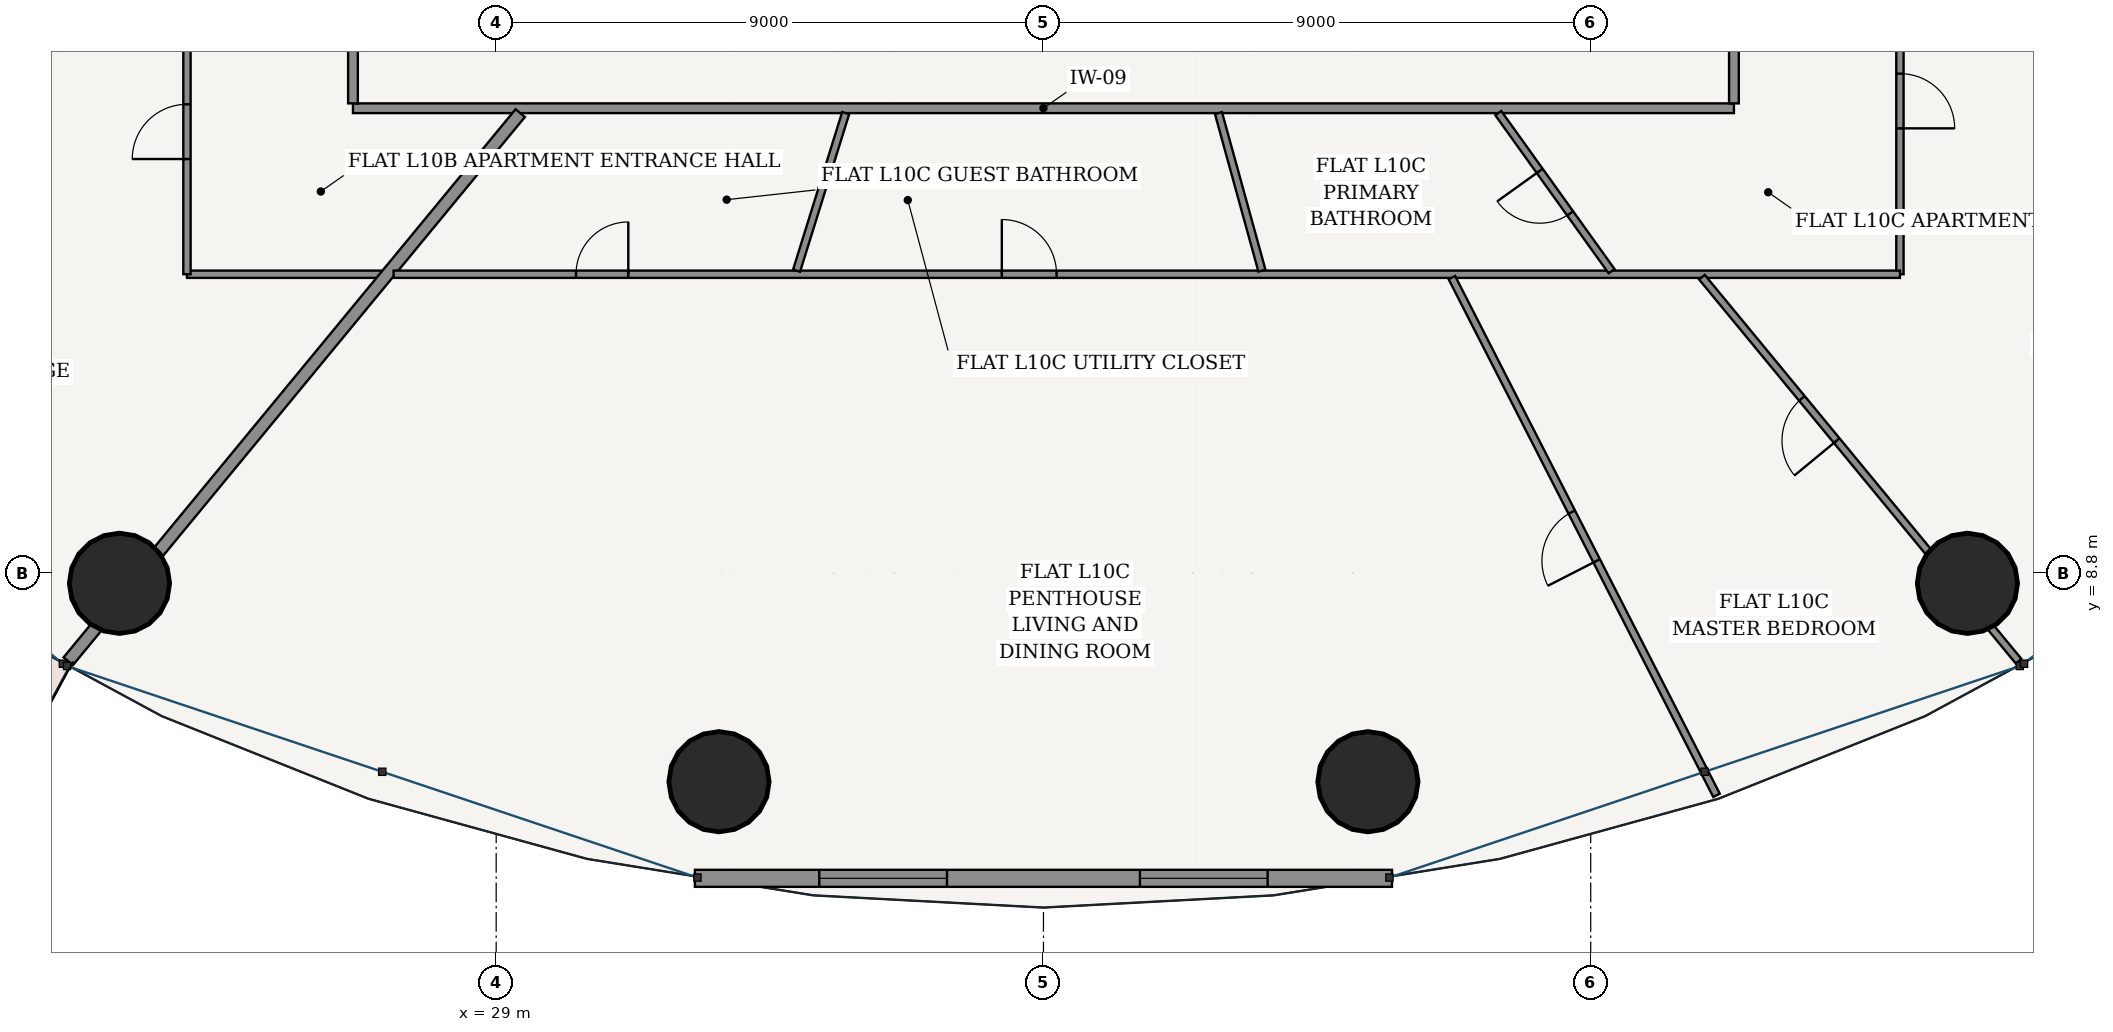
"""IFC4 building model, lengths in metres.
Left out: names, types, materials, properties, quantities, classifications, styles, units other than length and angle.
Written with IfcOpenShell. Run it as: python <this file> out.ifc"""

import sys

from ifc_helpers import new_model, si_unit, direction, frame, frame_2d, origin, origin_2d, place, context, subcontext, project, spatial, rectangle, hollow_circle, extrude, source, transform, mapped, element, fill, save


model = new_model("IFC4")
c1 = context("Model", 3, precision=1e-05, world=origin(), true_north=direction((-0.2419218956, 0.970295726276)))
c2 = subcontext(c1, "Body", "Model", "MODEL_VIEW")
j1 = project(units=[si_unit("LENGTHUNIT", "METRE"), si_unit("PLANEANGLEUNIT", "RADIAN")], contexts=[c1])
p1 = place(None, origin())
s1 = spatial("IfcSite", under=j1, at=p1, CompositionType="ELEMENT")
p2 = place(p1, origin())
s2 = spatial("IfcBuilding", under=s1, at=p2, CompositionType="ELEMENT")
p3 = place(p2, frame((0.0, 0.0, 42.0)))
s3 = spatial("IfcBuildingStorey", under=s2, at=p3, CompositionType="ELEMENT", Elevation=42.0)
for number, where, z_axis, x_axis in (
    (1, (22.805, 8.632, 0.0), (0.0, 0.0, 1.0), (1.0, 0.0, 0.0)),
    (2, (32.664, 5.37, 0.0), (0.0, 0.0, 1.0), (1.0, 0.0, 0.0)),
    (3, (43.336, 5.37, 0.0), (0.0, 0.0, 1.0), (1.0, 0.0, 0.0)),
    (4, (53.195, 8.632, 0.0), (0.0, 0.0, 1.0), (1.0, 0.0, 0.0)),
):
    element("IfcColumn", number, at=place(p3, frame(where, z_axis=z_axis, x_axis=x_axis)), inside=s3, PredefinedType="COLUMN", context=c2, shape_type="SweptSolid", body=[
        extrude(hollow_circle(Radius=0.825, WallThickness=0.05, at=origin_2d()), origin(), (0.0, 0.0, 1.0), 3.6),
    ])
p4 = place(p3, frame((32.268, 3.781, 0.0), z_axis=(0.0, 0.0, 1.0), x_axis=(1.0, 0.0, 0.0)))
e5 = element("IfcWall", 5, at=p4, inside=s3, PredefinedType="SOLIDWALL", context=c2, shape_type="SweptSolid", body=[
    extrude(rectangle(XDim=11.463, YDim=0.28, at=frame_2d((5.732, 0.0))), origin(), (0.0, 0.0, 1.0), 3.32),
])
p5 = place(p4, frame((2.045, 0.0, 0.85)))
e6 = element("IfcOpeningElement", 6, at=p5, cuts=e5, PredefinedType="OPENING", context=c2, shape_type="SweptSolid", body=[
    extrude(rectangle(XDim=2.1, YDim=1.95, at=frame_2d((1.05, 0.975))), frame((0.0, 0.15, 0.0), z_axis=(0.0, -1.0, 0.0), x_axis=(1.0, 0.0, 0.0)), (0.0, 0.0, 1.0), 0.3),
])
p6 = place(p4, frame((7.318, 0.0, 0.85)))
e7 = element("IfcOpeningElement", 7, at=p6, cuts=e5, PredefinedType="OPENING", context=c2, shape_type="SweptSolid", body=[
    extrude(rectangle(XDim=2.1, YDim=1.95, at=frame_2d((1.05, 0.975))), frame((0.0, 0.15, 0.0), z_axis=(0.0, -1.0, 0.0), x_axis=(1.0, 0.0, 0.0)), (0.0, 0.0, 1.0), 0.3),
])
p7 = place(p3, frame((26.645, 16.445, 0.0), z_axis=(0.0, 0.0, 1.0), x_axis=(1.0, 0.0, 0.0)))
e8 = element("IfcWall", 8, at=p7, inside=s3, PredefinedType="PARTITIONING", context=c2, shape_type="SweptSolid", body=[
    extrude(rectangle(XDim=22.71, YDim=0.16, at=frame_2d((11.355, 0.0))), origin(), (0.0, 0.0, 1.0), 2.688),
])
p8 = place(p3, frame((26.645, 16.525, 0.0), z_axis=(0.0, 0.0, 1.0), x_axis=(0.0, 1.0, 0.0)))
e9 = element("IfcWall", 9, at=p8, inside=s3, PredefinedType="PARTITIONING", context=c2, shape_type="SweptSolid", body=[
    extrude(rectangle(XDim=20.55, YDim=0.16, at=frame_2d((10.275, 0.0))), origin(), (0.0, 0.0, 1.0), 2.688),
])
p9 = place(p8, frame((1.226, 0.0, 0.0)))
e10 = element("IfcOpeningElement", 10, at=p9, cuts=e9, PredefinedType="OPENING", context=c2, shape_type="SweptSolid", body=[
    extrude(rectangle(XDim=0.98, YDim=2.2, at=frame_2d((0.49, 1.1))), frame((0.0, 0.09, 0.0), z_axis=(0.0, -1.0, 0.0), x_axis=(1.0, 0.0, 0.0)), (0.0, 0.0, 1.0), 0.18),
])
p10 = place(p3, frame((49.355, 16.525, 0.0), z_axis=(0.0, 0.0, 1.0), x_axis=(0.0, 1.0, 0.0)))
e11 = element("IfcWall", 11, at=p10, inside=s3, PredefinedType="PARTITIONING", context=c2, shape_type="SweptSolid", body=[
    extrude(rectangle(XDim=20.55, YDim=0.16, at=frame_2d((10.275, 0.0))), origin(), (0.0, 0.0, 1.0), 2.688),
])
p11 = place(p10, frame((17.207, 0.0, 0.0)))
e12 = element("IfcOpeningElement", 12, at=p11, cuts=e11, PredefinedType="OPENING", context=c2, shape_type="SweptSolid", body=[
    extrude(rectangle(XDim=0.98, YDim=2.2, at=frame_2d((0.49, 1.1))), frame((0.0, 0.09, 0.0), z_axis=(0.0, -1.0, 0.0), x_axis=(1.0, 0.0, 0.0)), (0.0, 0.0, 1.0), 0.18),
])
p12 = place(p10, frame((1.892, 0.0, 0.0)))
e13 = element("IfcOpeningElement", 13, at=p12, cuts=e11, PredefinedType="OPENING", context=c2, shape_type="SweptSolid", body=[
    extrude(rectangle(XDim=0.98, YDim=2.2, at=frame_2d((0.49, 1.1))), frame((0.0, 0.09, 0.0), z_axis=(0.0, -1.0, 0.0), x_axis=(1.0, 0.0, 0.0)), (0.0, 0.0, 1.0), 0.18),
])
p13 = place(p3, frame((27.109, 13.715, 0.0), z_axis=(0.0, 0.0, 1.0), x_axis=(-1.0, 0.0, 0.0)))
e14 = element("IfcWall", 14, at=p13, inside=s3, PredefinedType="PARTITIONING", context=c2, shape_type="SweptSolid", body=[
    extrude(rectangle(XDim=3.194, YDim=0.12, at=frame_2d((1.597, 0.0))), origin(), (0.0, 0.0, 1.0), 2.688),
])
p14 = place(p3, frame((23.915, 13.715, 0.0), z_axis=(0.0, 0.0, 1.0), x_axis=(0.0, 1.0, 0.0)))
e15 = element("IfcWall", 15, at=p14, inside=s3, PredefinedType="PARTITIONING", context=c2, shape_type="SweptSolid", body=[
    extrude(rectangle(XDim=26.17, YDim=0.12, at=frame_2d((13.085, 0.0))), origin(), (0.0, 0.0, 1.0), 2.688),
])
p15 = place(p14, frame((1.895, 0.0, 0.0)))
e16 = element("IfcOpeningElement", 16, at=p15, cuts=e15, PredefinedType="OPENING", context=c2, shape_type="SweptSolid", body=[
    extrude(rectangle(XDim=0.9, YDim=2.15, at=frame_2d((0.45, 1.075))), frame((0.0, 0.07, 0.0), z_axis=(0.0, -1.0, 0.0), x_axis=(1.0, 0.0, 0.0)), (0.0, 0.0, 1.0), 0.14),
])
p16 = place(p14, frame((11.498, 0.0, 0.0)))
e17 = element("IfcOpeningElement", 17, at=p16, cuts=e15, PredefinedType="OPENING", context=c2, shape_type="SweptSolid", body=[
    extrude(rectangle(XDim=0.9, YDim=2.15, at=frame_2d((0.45, 1.075))), frame((0.0, 0.07, 0.0), z_axis=(0.0, -1.0, 0.0), x_axis=(1.0, 0.0, 0.0)), (0.0, 0.0, 1.0), 0.14),
])
p17 = place(p14, frame((23.831, 0.0, 0.0)))
e18 = element("IfcOpeningElement", 18, at=p17, cuts=e15, PredefinedType="OPENING", context=c2, shape_type="SweptSolid", body=[
    extrude(rectangle(XDim=0.86, YDim=2.15, at=frame_2d((0.43, 1.075))), frame((0.0, 0.07, 0.0), z_axis=(0.0, -1.0, 0.0), x_axis=(1.0, 0.0, 0.0)), (0.0, 0.0, 1.0), 0.14),
])
p18 = place(p3, frame((23.861, 19.144, 0.0), z_axis=(0.0, 0.0, 1.0), x_axis=(-0.879372452045, -0.476134529922, 0.0)))
e19 = element("IfcWall", 19, at=p18, inside=s3, PredefinedType="PARTITIONING", context=c2, shape_type="SweptSolid", body=[
    extrude(rectangle(XDim=11.219, YDim=0.12, at=frame_2d((5.61, 0.0))), origin(), (0.0, 0.0, 1.0), 2.688),
])
p19 = place(p18, frame((4.097, 0.0, 0.0)))
e20 = element("IfcOpeningElement", 20, at=p19, cuts=e19, PredefinedType="OPENING", context=c2, shape_type="SweptSolid", body=[
    extrude(rectangle(XDim=0.9, YDim=2.15, at=frame_2d((0.45, 1.075))), frame((0.0, 0.07, 0.0), z_axis=(0.0, -1.0, 0.0), x_axis=(1.0, 0.0, 0.0)), (0.0, 0.0, 1.0), 0.14),
])
p20 = place(p3, frame((29.396, 16.365, 0.0), z_axis=(0.0, 0.0, 1.0), x_axis=(-0.636186165667, -0.771535587393, 0.0)))
e21 = element("IfcWall", 21, at=p20, inside=s3, PredefinedType="PARTITIONING", context=c2, shape_type="SweptSolid", body=[
    extrude(rectangle(XDim=11.683, YDim=0.2, at=frame_2d((5.842, 0.0))), origin(), (0.0, 0.0, 1.0), 2.688),
])
p21 = place(p3, frame((52.085, 28.968, 0.0), z_axis=(0.0, 0.0, 1.0), x_axis=(0.0, -1.0, 0.0)))
e22 = element("IfcWall", 22, at=p21, inside=s3, PredefinedType="PARTITIONING", context=c2, shape_type="SweptSolid", body=[
    extrude(rectangle(XDim=15.253, YDim=0.12, at=frame_2d((7.626, 0.0))), origin(), (0.0, 0.0, 1.0), 2.688),
])
p22 = place(p21, frame((11.954, 0.0, 0.0)))
e23 = element("IfcOpeningElement", 23, at=p22, cuts=e22, PredefinedType="OPENING", context=c2, shape_type="SweptSolid", body=[
    extrude(rectangle(XDim=0.9, YDim=2.15, at=frame_2d((0.45, 1.075))), frame((0.0, 0.07, 0.0), z_axis=(0.0, -1.0, 0.0), x_axis=(1.0, 0.0, 0.0)), (0.0, 0.0, 1.0), 0.14),
])
p23 = place(p21, frame((5.182, 0.0, 0.0)))
e24 = element("IfcOpeningElement", 24, at=p23, cuts=e22, PredefinedType="OPENING", context=c2, shape_type="SweptSolid", body=[
    extrude(rectangle(XDim=0.9, YDim=2.15, at=frame_2d((0.45, 1.075))), frame((0.0, 0.07, 0.0), z_axis=(0.0, -1.0, 0.0), x_axis=(1.0, 0.0, 0.0)), (0.0, 0.0, 1.0), 0.14),
])
p24 = place(p21, frame((1.889, 0.0, 0.0)))
e25 = element("IfcOpeningElement", 25, at=p24, cuts=e22, PredefinedType="OPENING", context=c2, shape_type="SweptSolid", body=[
    extrude(rectangle(XDim=0.9, YDim=2.15, at=frame_2d((0.45, 1.075))), frame((0.0, 0.07, 0.0), z_axis=(0.0, -1.0, 0.0), x_axis=(1.0, 0.0, 0.0)), (0.0, 0.0, 1.0), 0.14),
])
p25 = place(p3, frame((52.085, 13.715, 0.0), z_axis=(0.0, 0.0, 1.0), x_axis=(-1.0, 0.0, 0.0)))
e26 = element("IfcWall", 26, at=p25, inside=s3, PredefinedType="PARTITIONING", context=c2, shape_type="SweptSolid", body=[
    extrude(rectangle(XDim=24.772, YDim=0.12, at=frame_2d((12.386, 0.0))), origin(), (0.0, 0.0, 1.0), 2.688),
])
p26 = place(p25, frame((20.912, 0.0, 0.0)))
e27 = element("IfcOpeningElement", 27, at=p26, cuts=e26, PredefinedType="OPENING", context=c2, shape_type="SweptSolid", body=[
    extrude(rectangle(XDim=0.86, YDim=2.15, at=frame_2d((0.43, 1.075))), frame((0.0, 0.07, 0.0), z_axis=(0.0, -1.0, 0.0), x_axis=(1.0, 0.0, 0.0)), (0.0, 0.0, 1.0), 0.14),
])
p27 = place(p25, frame((13.87, 0.0, 0.0)))
e28 = element("IfcOpeningElement", 28, at=p27, cuts=e26, PredefinedType="OPENING", context=c2, shape_type="SweptSolid", body=[
    extrude(rectangle(XDim=0.9, YDim=2.15, at=frame_2d((0.45, 1.075))), frame((0.0, 0.07, 0.0), z_axis=(0.0, -1.0, 0.0), x_axis=(1.0, 0.0, 0.0)), (0.0, 0.0, 1.0), 0.14),
])
p28 = place(p3, frame((44.717, 13.66, 0.0), z_axis=(0.0, 0.0, 1.0), x_axis=(0.455131303234, -0.890424335256, 0.0)))
e29 = element("IfcWall", 29, at=p28, inside=s3, PredefinedType="PARTITIONING", context=c2, shape_type="SweptSolid", body=[
    extrude(rectangle(XDim=9.562, YDim=0.12, at=frame_2d((4.781, 0.0))), origin(), (0.0, 0.0, 1.0), 2.762),
])
p29 = place(p28, frame((4.331, 0.0, 0.0)))
e30 = element("IfcOpeningElement", 30, at=p29, cuts=e29, PredefinedType="OPENING", context=c2, shape_type="SweptSolid", body=[
    extrude(rectangle(XDim=0.9, YDim=2.15, at=frame_2d((0.45, 1.075))), frame((0.0, 0.07, 0.0), z_axis=(0.0, -1.0, 0.0), x_axis=(1.0, 0.0, 0.0)), (0.0, 0.0, 1.0), 0.14),
])
p30 = place(p3, frame((48.829, 13.667, 0.0), z_axis=(0.0, 0.0, 1.0), x_axis=(0.636177533893, -0.771542704826, 0.0)))
e31 = element("IfcWall", 31, at=p30, inside=s3, PredefinedType="PARTITIONING", context=c2, shape_type="SweptSolid", body=[
    extrude(rectangle(XDim=8.187, YDim=0.12, at=frame_2d((4.093, 0.0))), origin(), (0.0, 0.0, 1.0), 2.688),
])
p31 = place(p30, frame((2.584, 0.0, 0.0)))
e32 = element("IfcOpeningElement", 32, at=p31, cuts=e31, PredefinedType="OPENING", context=c2, shape_type="SweptSolid", body=[
    extrude(rectangle(XDim=0.9, YDim=2.15, at=frame_2d((0.45, 1.075))), frame((0.0, 0.07, 0.0), z_axis=(0.0, -1.0, 0.0), x_axis=(1.0, 0.0, 0.0)), (0.0, 0.0, 1.0), 0.14),
])
p32 = place(p3, frame((52.139, 19.144, 0.0), z_axis=(0.0, 0.0, 1.0), x_axis=(0.879372452045, -0.476134529922, 0.0)))
e33 = element("IfcWall", 33, at=p32, inside=s3, PredefinedType="PARTITIONING", context=c2, shape_type="SweptSolid", body=[
    extrude(rectangle(XDim=11.219, YDim=0.12, at=frame_2d((5.61, 0.0))), origin(), (0.0, 0.0, 1.0), 2.688),
])
p33 = place(p3, frame((34.748, 16.365, 0.0), z_axis=(0.0, 0.0, 1.0), x_axis=(-0.297598752493, -0.954691040345, 0.0)))
e34 = element("IfcWall", 34, at=p33, inside=s3, PredefinedType="PARTITIONING", context=c2, shape_type="SweptSolid", body=[
    extrude(rectangle(XDim=2.714, YDim=0.12, at=frame_2d((1.357, 0.0))), origin(), (0.0, 0.0, 1.0), 3.32),
])
p34 = place(p3, frame((40.878, 16.365, 0.0), z_axis=(0.0, 0.0, 1.0), x_axis=(0.265853298244, -0.964013497734, 0.0)))
e35 = element("IfcWall", 35, at=p34, inside=s3, PredefinedType="PARTITIONING", context=c2, shape_type="SweptSolid", body=[
    extrude(rectangle(XDim=2.687, YDim=0.12, at=frame_2d((1.344, 0.0))), origin(), (0.0, 0.0, 1.0), 3.32),
])
p35 = place(p3, frame((45.48, 16.365, 0.0), z_axis=(0.0, 0.0, 1.0), x_axis=(0.582566008831, -0.812783393872, 0.0)))
e36 = element("IfcWall", 36, at=p35, inside=s3, PredefinedType="PARTITIONING", context=c2, shape_type="SweptSolid", body=[
    extrude(rectangle(XDim=3.198, YDim=0.12, at=frame_2d((1.599, 0.0))), origin(), (0.0, 0.0, 1.0), 3.32),
])
p36 = place(p35, frame((1.169, 0.0, 0.0)))
e37 = element("IfcOpeningElement", 37, at=p36, cuts=e36, PredefinedType="OPENING", context=c2, shape_type="SweptSolid", body=[
    extrude(rectangle(XDim=0.86, YDim=2.15, at=frame_2d((0.43, 1.075))), frame((0.0, 0.07, 0.0), z_axis=(0.0, -1.0, 0.0), x_axis=(1.0, 0.0, 0.0)), (0.0, 0.0, 1.0), 0.14),
])
m1 = source(origin(), c2, "Body", "SweptSolid", [
    extrude(rectangle(XDim=2.1, YDim=1.95, at=frame_2d((1.05, 0.975))), frame((0.0, 0.03, 0.0), z_axis=(0.0, -1.0, 0.0), x_axis=(1.0, 0.0, 0.0)), (0.0, 0.0, 1.0), 0.06),
])
p37 = place(p5, origin())
e38 = element("IfcWindow", 38, at=p37, inside=s3, PartitioningType="SINGLE_PANEL", PredefinedType="WINDOW", context=c2, shape_type="MappedRepresentation", body=[
    mapped(m1, transform((0.0, 0.0, 0.0), scale=1.0)),
])
fill(e6, e38)
p38 = place(p6, origin())
e39 = element("IfcWindow", 39, at=p38, inside=s3, PartitioningType="SINGLE_PANEL", PredefinedType="WINDOW", context=c2, shape_type="MappedRepresentation", body=[
    mapped(m1, transform((0.0, 0.0, 0.0), scale=1.0)),
])
fill(e7, e39)
m2 = source(origin(), c2, "Body", "SweptSolid", [
    extrude(rectangle(XDim=0.9, YDim=2.15, at=frame_2d((0.45, 1.075))), frame((0.0, 0.025, 0.0), z_axis=(0.0, -1.0, 0.0), x_axis=(1.0, 0.0, 0.0)), (0.0, 0.0, 1.0), 0.05),
])
p39 = place(p15, origin())
e40 = element("IfcDoor", 40, at=p39, inside=s3, OperationType="SINGLE_SWING_LEFT", PredefinedType="DOOR", context=c2, shape_type="MappedRepresentation", body=[
    mapped(m2, transform((0.0, 0.0, 0.0), scale=1.0)),
])
fill(e16, e40)
m3 = source(origin(), c2, "Body", "SweptSolid", [
    extrude(rectangle(XDim=0.86, YDim=2.15, at=frame_2d((0.43, 1.075))), frame((0.0, 0.025, 0.0), z_axis=(0.0, -1.0, 0.0), x_axis=(1.0, 0.0, 0.0)), (0.0, 0.0, 1.0), 0.05),
])
p40 = place(p36, frame((0.86, 0.0, 0.0), z_axis=(0.0, 0.0, 1.0), x_axis=(-1.0, 0.0, 0.0)))
e41 = element("IfcDoor", 41, at=p40, inside=s3, OperationType="SINGLE_SWING_RIGHT", PredefinedType="DOOR", context=c2, shape_type="MappedRepresentation", body=[
    mapped(m3, transform((0.0, 0.0, 0.0), scale=1.0)),
])
fill(e37, e41)
p41 = place(p22, origin())
e42 = element("IfcDoor", 42, at=p41, inside=s3, OperationType="SINGLE_SWING_RIGHT", PredefinedType="DOOR", context=c2, shape_type="MappedRepresentation", body=[
    mapped(m2, transform((0.0, 0.0, 0.0), scale=1.0)),
])
fill(e23, e42)
p42 = place(p31, frame((0.9, 0.0, 0.0), z_axis=(0.0, 0.0, 1.0), x_axis=(-1.0, 0.0, 0.0)))
e43 = element("IfcDoor", 43, at=p42, inside=s3, OperationType="SINGLE_SWING_LEFT", PredefinedType="DOOR", context=c2, shape_type="MappedRepresentation", body=[
    mapped(m2, transform((0.0, 0.0, 0.0), scale=1.0)),
])
fill(e32, e43)
p43 = place(p29, frame((0.9, 0.0, 0.0), z_axis=(0.0, 0.0, 1.0), x_axis=(-1.0, 0.0, 0.0)))
e44 = element("IfcDoor", 44, at=p43, inside=s3, OperationType="SINGLE_SWING_LEFT", PredefinedType="DOOR", context=c2, shape_type="MappedRepresentation", body=[
    mapped(m2, transform((0.0, 0.0, 0.0), scale=1.0)),
])
fill(e30, e44)
p44 = place(p26, frame((0.86, 0.0, 0.0), z_axis=(0.0, 0.0, 1.0), x_axis=(-1.0, 0.0, 0.0)))
e45 = element("IfcDoor", 45, at=p44, inside=s3, OperationType="SINGLE_SWING_RIGHT", PredefinedType="DOOR", context=c2, shape_type="MappedRepresentation", body=[
    mapped(m3, transform((0.0, 0.0, 0.0), scale=1.0)),
])
fill(e27, e45)
p45 = place(p27, frame((0.9, 0.0, 0.0), z_axis=(0.0, 0.0, 1.0), x_axis=(-1.0, 0.0, 0.0)))
e46 = element("IfcDoor", 46, at=p45, inside=s3, OperationType="SINGLE_SWING_LEFT", PredefinedType="DOOR", context=c2, shape_type="MappedRepresentation", body=[
    mapped(m2, transform((0.0, 0.0, 0.0), scale=1.0)),
])
fill(e28, e46)
save(model, sys.argv[1])
